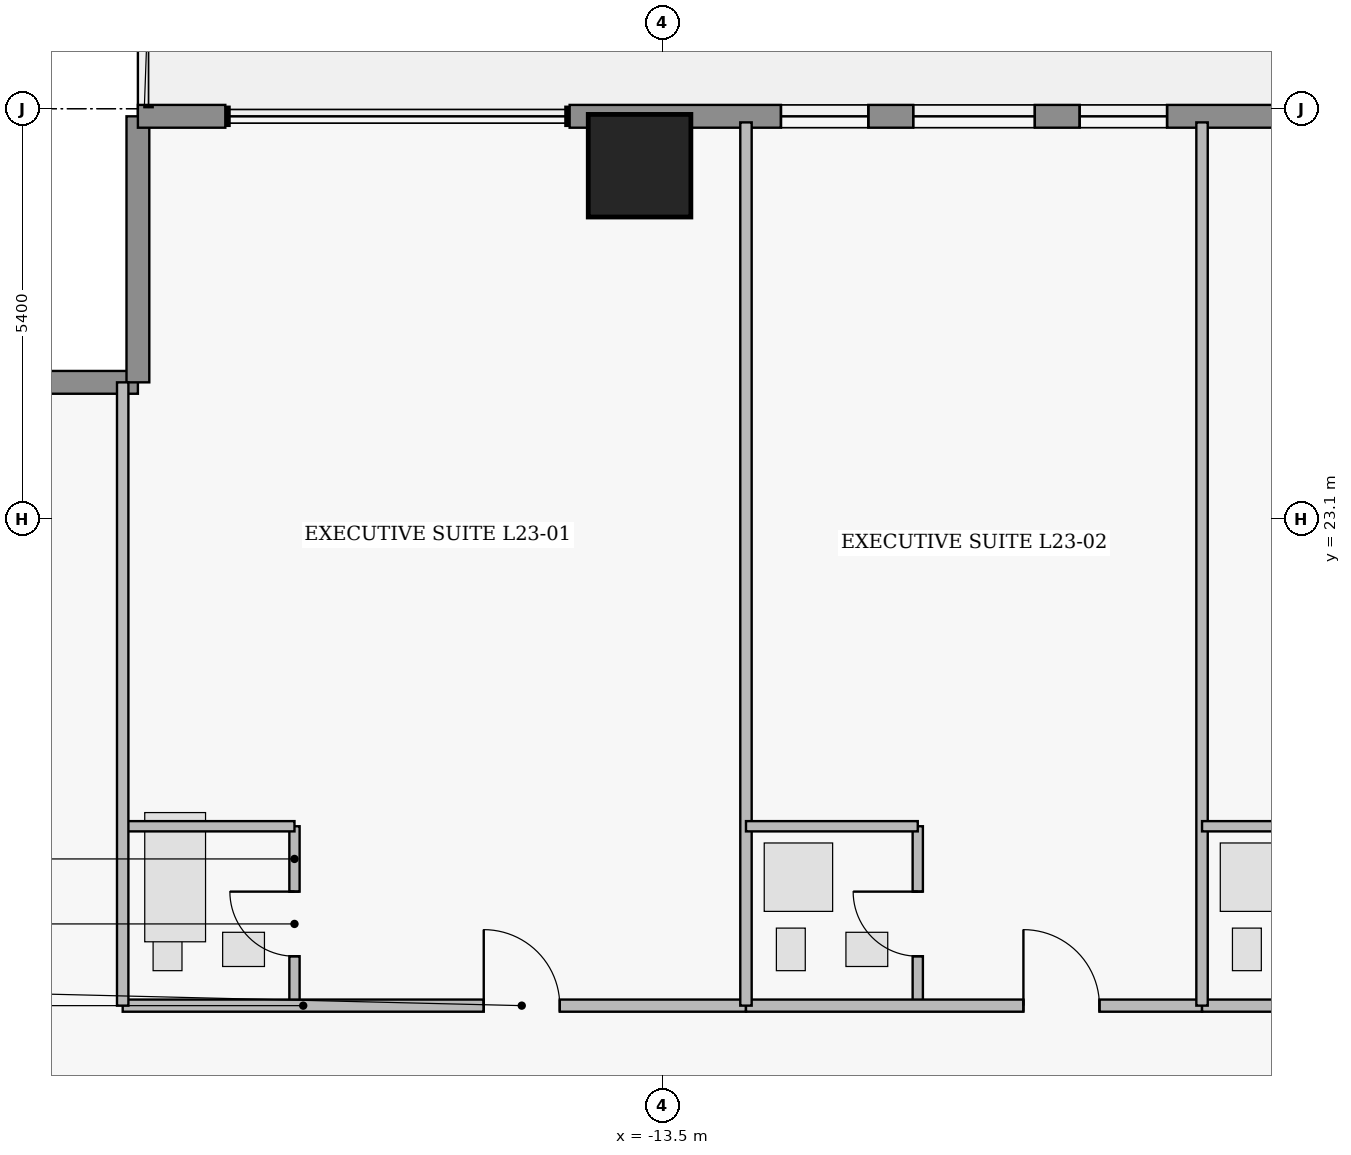
"""IFC4 building model, lengths in metres.
Left out: names, types, materials, properties, quantities, classifications, styles, units other than length and angle.
Written with IfcOpenShell. Run it as: python <this file> out.ifc"""

import sys

from ifc_helpers import new_model, si_unit, direction, frame, frame_2d, origin, origin_2d, place, context, subcontext, project, spatial, rectangle, extrude, element, fill, save


model = new_model("IFC4")
c1 = context("Model", 3, precision=1e-05, world=origin(), true_north=direction((0.0, 1.0)))
c2 = subcontext(c1, "Body", "Model", "MODEL_VIEW")
j1 = project(units=[si_unit("LENGTHUNIT", "METRE"), si_unit("PLANEANGLEUNIT", "RADIAN")], contexts=[c1])
p1 = place(None, origin())
s1 = spatial("IfcSite", under=j1, at=p1, CompositionType="ELEMENT")
p2 = place(p1, origin())
s2 = spatial("IfcBuilding", under=s1, at=p2, CompositionType="ELEMENT")
p3 = place(p2, frame((0.0, 0.0, 95.65)))
s3 = spatial("IfcBuildingStorey", under=s2, at=p3, CompositionType="ELEMENT", Elevation=95.65)
p4 = place(p3, frame((-13.8, 27.75, 0.43), z_axis=(0.0, 0.0, 1.0), x_axis=(1.0, 0.0, 0.0)))
e1 = element("IfcColumn", 1, at=p4, inside=s3, PredefinedType="COLUMN", context=c2, shape_type="SweptSolid", body=[
    extrude(rectangle(XDim=1.35, YDim=1.35, at=origin_2d()), origin(), (0.0, 0.0, 1.0), 3.22),
])
for number, where, z_axis, x_axis in (
    (2, (-23.9, 24.9, 0.0), (0.0, 0.0, 1.0), (1.0, 0.0, 0.0)),
    (3, (-20.4, 24.9, 0.0), (0.0, 0.0, 1.0), (0.0, 1.0, 0.0)),
):
    element("IfcWall", number, at=place(p3, frame(where, z_axis=z_axis, x_axis=x_axis)), inside=s3, PredefinedType="STANDARD", context=c2, shape_type="SweptSolid", body=[
        extrude(rectangle(XDim=3.5, YDim=0.3, at=frame_2d((1.75, 0.0))), origin(), (0.0, 0.0, 1.0), 3.43),
    ])
p5 = place(p3, frame((-20.4, 28.4, 0.0), z_axis=(0.0, 0.0, 1.0), x_axis=(1.0, 0.0, 0.0)))
e4 = element("IfcWall", 4, at=p5, inside=s3, PredefinedType="STANDARD", context=c2, shape_type="SweptSolid", body=[
    extrude(rectangle(XDim=1.15, YDim=0.3, at=frame_2d((0.575, 0.0))), origin(), (0.0, 0.0, 1.0), 3.43),
])
p6 = place(p3, frame((-14.72, 28.4, 0.0), z_axis=(0.0, 0.0, 1.0), x_axis=(1.0, 0.0, 0.0)))
e5 = element("IfcWall", 5, at=p6, inside=s3, PredefinedType="STANDARD", context=c2, shape_type="SweptSolid", body=[
    extrude(rectangle(XDim=11.04, YDim=0.3, at=frame_2d((5.52, 0.0))), origin(), (0.0, 0.0, 1.0), 3.43),
])
p7 = place(p6, frame((4.52, 0.0, 0.85)))
e6 = element("IfcOpeningElement", 6, at=p7, cuts=e5, PredefinedType="OPENING", context=c2, shape_type="SweptSolid", body=[
    extrude(rectangle(XDim=1.6, YDim=1.8, at=frame_2d((0.8, 0.9))), frame((0.0, 0.16, 0.0), z_axis=(0.0, -1.0, 0.0), x_axis=(1.0, 0.0, 0.0)), (0.0, 0.0, 1.0), 0.32),
])
p8 = place(p6, frame((2.78, 0.0, 0.95)))
e7 = element("IfcOpeningElement", 7, at=p8, cuts=e5, PredefinedType="OPENING", context=c2, shape_type="SweptSolid", body=[
    extrude(rectangle(XDim=1.15, YDim=1.55, at=frame_2d((0.575, 0.775))), frame((0.0, 0.16, 0.0), z_axis=(0.0, -1.0, 0.0), x_axis=(1.0, 0.0, 0.0)), (0.0, 0.0, 1.0), 0.32),
])
p9 = place(p6, frame((6.71, 0.0, 0.95)))
e8 = element("IfcOpeningElement", 8, at=p9, cuts=e5, PredefinedType="OPENING", context=c2, shape_type="SweptSolid", body=[
    extrude(rectangle(XDim=1.15, YDim=1.55, at=frame_2d((0.575, 0.775))), frame((0.0, 0.16, 0.0), z_axis=(0.0, -1.0, 0.0), x_axis=(1.0, 0.0, 0.0)), (0.0, 0.0, 1.0), 0.32),
])
p10 = place(p3, frame((-18.34, 16.7, 0.0), z_axis=(0.0, 0.0, 1.0), x_axis=(0.0, 1.0, 0.0)))
e9 = element("IfcWall", 9, at=p10, inside=s3, PredefinedType="PLUMBINGWALL", context=c2, shape_type="SweptSolid", body=[
    extrude(rectangle(XDim=2.36, YDim=0.135, at=frame_2d((1.18, 0.0))), origin(), (0.0, 0.0, 1.0), 3.43),
])
p11 = place(p10, frame((0.65, 0.0, 0.0)))
e10 = element("IfcOpeningElement", 10, at=p11, cuts=e9, PredefinedType="OPENING", context=c2, shape_type="SweptSolid", body=[
    extrude(rectangle(XDim=0.85, YDim=2.1, at=frame_2d((0.425, 1.05))), frame((0.0, 0.077, 0.0), z_axis=(0.0, -1.0, 0.0), x_axis=(1.0, 0.0, 0.0)), (0.0, 0.0, 1.0), 0.155),
])
p12 = place(p3, frame((-20.6, 16.7, 0.0), z_axis=(0.0, 0.0, 1.0), x_axis=(1.0, 0.0, 0.0)))
e11 = element("IfcWall", 11, at=p12, inside=s3, PredefinedType="PARTITIONING", context=c2, shape_type="SweptSolid", body=[
    extrude(rectangle(XDim=8.2, YDim=0.16, at=frame_2d((4.1, 0.0))), origin(), (0.0, 0.0, 1.0), 2.973),
])
p13 = place(p12, frame((4.75, 0.0, 0.0)))
e12 = element("IfcOpeningElement", 12, at=p13, cuts=e11, PredefinedType="OPENING", context=c2, shape_type="SweptSolid", body=[
    extrude(rectangle(XDim=1.0, YDim=2.15, at=frame_2d((0.5, 1.075))), frame((0.0, 0.09, 0.0), z_axis=(0.0, -1.0, 0.0), x_axis=(1.0, 0.0, 0.0)), (0.0, 0.0, 1.0), 0.18),
])
p14 = place(p3, frame((-10.14, 16.7, 0.0), z_axis=(0.0, 0.0, 1.0), x_axis=(0.0, 1.0, 0.0)))
e13 = element("IfcWall", 13, at=p14, inside=s3, PredefinedType="PLUMBINGWALL", context=c2, shape_type="SweptSolid", body=[
    extrude(rectangle(XDim=2.36, YDim=0.135, at=frame_2d((1.18, 0.0))), origin(), (0.0, 0.0, 1.0), 3.43),
])
p15 = place(p14, frame((0.65, 0.0, 0.0)))
e14 = element("IfcOpeningElement", 14, at=p15, cuts=e13, PredefinedType="OPENING", context=c2, shape_type="SweptSolid", body=[
    extrude(rectangle(XDim=0.85, YDim=2.1, at=frame_2d((0.425, 1.05))), frame((0.0, 0.077, 0.0), z_axis=(0.0, -1.0, 0.0), x_axis=(1.0, 0.0, 0.0)), (0.0, 0.0, 1.0), 0.155),
])
p16 = place(p3, frame((-12.4, 16.7, 0.0), z_axis=(0.0, 0.0, 1.0), x_axis=(1.0, 0.0, 0.0)))
e15 = element("IfcWall", 15, at=p16, inside=s3, PredefinedType="PARTITIONING", context=c2, shape_type="SweptSolid", body=[
    extrude(rectangle(XDim=6.0, YDim=0.16, at=frame_2d((3.0, 0.0))), origin(), (0.0, 0.0, 1.0), 2.973),
])
p17 = place(p16, frame((3.65, 0.0, 0.0)))
e16 = element("IfcOpeningElement", 16, at=p17, cuts=e15, PredefinedType="OPENING", context=c2, shape_type="SweptSolid", body=[
    extrude(rectangle(XDim=1.0, YDim=2.15, at=frame_2d((0.5, 1.075))), frame((0.0, 0.09, 0.0), z_axis=(0.0, -1.0, 0.0), x_axis=(1.0, 0.0, 0.0)), (0.0, 0.0, 1.0), 0.18),
])
p18 = place(p3, frame((-6.4, 16.7, 0.0), z_axis=(0.0, 0.0, 1.0), x_axis=(1.0, 0.0, 0.0)))
e17 = element("IfcWall", 17, at=p18, inside=s3, PredefinedType="PARTITIONING", context=c2, shape_type="SweptSolid", body=[
    extrude(rectangle(XDim=6.0, YDim=0.16, at=frame_2d((3.0, 0.0))), origin(), (0.0, 0.0, 1.0), 2.973),
])
p19 = place(p18, frame((3.65, 0.0, 0.0)))
e18 = element("IfcOpeningElement", 18, at=p19, cuts=e17, PredefinedType="OPENING", context=c2, shape_type="SweptSolid", body=[
    extrude(rectangle(XDim=1.0, YDim=2.15, at=frame_2d((0.5, 1.075))), frame((0.0, 0.09, 0.0), z_axis=(0.0, -1.0, 0.0), x_axis=(1.0, 0.0, 0.0)), (0.0, 0.0, 1.0), 0.18),
])
p20 = place(p3, frame((-20.6, 19.06, 0.0), z_axis=(0.0, 0.0, 1.0), x_axis=(1.0, 0.0, 0.0)))
e19 = element("IfcWall", 19, at=p20, inside=s3, PredefinedType="PLUMBINGWALL", context=c2, shape_type="SweptSolid", body=[
    extrude(rectangle(XDim=2.26, YDim=0.135, at=frame_2d((1.13, 0.0))), origin(), (0.0, 0.0, 1.0), 3.43),
])
p21 = place(p3, frame((-20.6, 16.7, 0.0), z_axis=(0.0, 0.0, 1.0), x_axis=(0.0, 1.0, 0.0)))
e20 = element("IfcWall", 20, at=p21, inside=s3, PredefinedType="PARTITIONING", context=c2, shape_type="SweptSolid", body=[
    extrude(rectangle(XDim=8.2, YDim=0.15, at=frame_2d((4.1, 0.0))), origin(), (0.0, 0.0, 1.0), 3.43),
])
p22 = place(p3, frame((-12.4, 16.7, 0.0), z_axis=(0.0, 0.0, 1.0), x_axis=(0.0, 1.0, 0.0)))
e21 = element("IfcWall", 21, at=p22, inside=s3, PredefinedType="PARTITIONING", context=c2, shape_type="SweptSolid", body=[
    extrude(rectangle(XDim=11.62, YDim=0.15, at=frame_2d((5.81, 0.0))), origin(), (0.0, 0.0, 1.0), 3.43),
])
p23 = place(p3, frame((-12.4, 19.06, 0.0), z_axis=(0.0, 0.0, 1.0), x_axis=(1.0, 0.0, 0.0)))
e22 = element("IfcWall", 22, at=p23, inside=s3, PredefinedType="PLUMBINGWALL", context=c2, shape_type="SweptSolid", body=[
    extrude(rectangle(XDim=2.26, YDim=0.135, at=frame_2d((1.13, 0.0))), origin(), (0.0, 0.0, 1.0), 2.973),
])
p24 = place(p3, frame((-6.4, 16.7, 0.0), z_axis=(0.0, 0.0, 1.0), x_axis=(0.0, 1.0, 0.0)))
e23 = element("IfcWall", 23, at=p24, inside=s3, PredefinedType="PARTITIONING", context=c2, shape_type="SweptSolid", body=[
    extrude(rectangle(XDim=11.62, YDim=0.15, at=frame_2d((5.81, 0.0))), origin(), (0.0, 0.0, 1.0), 3.43),
])
p25 = place(p3, frame((-6.4, 19.06, 0.0), z_axis=(0.0, 0.0, 1.0), x_axis=(1.0, 0.0, 0.0)))
e24 = element("IfcWall", 24, at=p25, inside=s3, PredefinedType="PLUMBINGWALL", context=c2, shape_type="SweptSolid", body=[
    extrude(rectangle(XDim=2.26, YDim=0.135, at=frame_2d((1.13, 0.0))), origin(), (0.0, 0.0, 1.0), 2.973),
])
p26 = place(p7, origin())
e25 = element("IfcWindow", 25, at=p26, inside=s3, PartitioningType="SINGLE_PANEL", PredefinedType="WINDOW", context=c2, shape_type="SweptSolid", body=[
    extrude(rectangle(XDim=1.6, YDim=1.8, at=frame_2d((0.8, 0.9))), frame((0.0, 0.03, 0.0), z_axis=(0.0, -1.0, 0.0), x_axis=(1.0, 0.0, 0.0)), (0.0, 0.0, 1.0), 0.06),
])
fill(e6, e25)
p27 = place(p8, origin())
e26 = element("IfcWindow", 26, at=p27, inside=s3, PartitioningType="SINGLE_PANEL", PredefinedType="WINDOW", context=c2, shape_type="SweptSolid", body=[
    extrude(rectangle(XDim=1.15, YDim=1.55, at=frame_2d((0.575, 0.775))), frame((0.0, 0.03, 0.0), z_axis=(0.0, -1.0, 0.0), x_axis=(1.0, 0.0, 0.0)), (0.0, 0.0, 1.0), 0.06),
])
fill(e7, e26)
p28 = place(p9, origin())
e27 = element("IfcWindow", 27, at=p28, inside=s3, PartitioningType="SINGLE_PANEL", PredefinedType="WINDOW", context=c2, shape_type="SweptSolid", body=[
    extrude(rectangle(XDim=1.15, YDim=1.55, at=frame_2d((0.575, 0.775))), frame((0.0, 0.03, 0.0), z_axis=(0.0, -1.0, 0.0), x_axis=(1.0, 0.0, 0.0)), (0.0, 0.0, 1.0), 0.06),
])
fill(e8, e27)
p29 = place(p11, origin())
e28 = element("IfcDoor", 28, at=p29, inside=s3, OperationType="SINGLE_SWING_RIGHT", PredefinedType="DOOR", context=c2, shape_type="SweptSolid", body=[
    extrude(rectangle(XDim=0.85, YDim=2.1, at=frame_2d((0.425, 1.05))), frame((0.0, 0.025, 0.0), z_axis=(0.0, -1.0, 0.0), x_axis=(1.0, 0.0, 0.0)), (0.0, 0.0, 1.0), 0.05),
])
fill(e10, e28)
p30 = place(p13, origin())
e29 = element("IfcDoor", 29, at=p30, inside=s3, OperationType="SINGLE_SWING_LEFT", PredefinedType="DOOR", context=c2, shape_type="SweptSolid", body=[
    extrude(rectangle(XDim=1.0, YDim=2.15, at=frame_2d((0.5, 1.075))), frame((0.0, 0.025, 0.0), z_axis=(0.0, -1.0, 0.0), x_axis=(1.0, 0.0, 0.0)), (0.0, 0.0, 1.0), 0.05),
])
fill(e12, e29)
p31 = place(p15, origin())
e30 = element("IfcDoor", 30, at=p31, inside=s3, OperationType="SINGLE_SWING_RIGHT", PredefinedType="DOOR", context=c2, shape_type="SweptSolid", body=[
    extrude(rectangle(XDim=0.85, YDim=2.1, at=frame_2d((0.425, 1.05))), frame((0.0, 0.025, 0.0), z_axis=(0.0, -1.0, 0.0), x_axis=(1.0, 0.0, 0.0)), (0.0, 0.0, 1.0), 0.05),
])
fill(e14, e30)
p32 = place(p17, origin())
e31 = element("IfcDoor", 31, at=p32, inside=s3, OperationType="SINGLE_SWING_LEFT", PredefinedType="DOOR", context=c2, shape_type="SweptSolid", body=[
    extrude(rectangle(XDim=1.0, YDim=2.15, at=frame_2d((0.5, 1.075))), frame((0.0, 0.025, 0.0), z_axis=(0.0, -1.0, 0.0), x_axis=(1.0, 0.0, 0.0)), (0.0, 0.0, 1.0), 0.05),
])
fill(e16, e31)
save(model, sys.argv[1])
